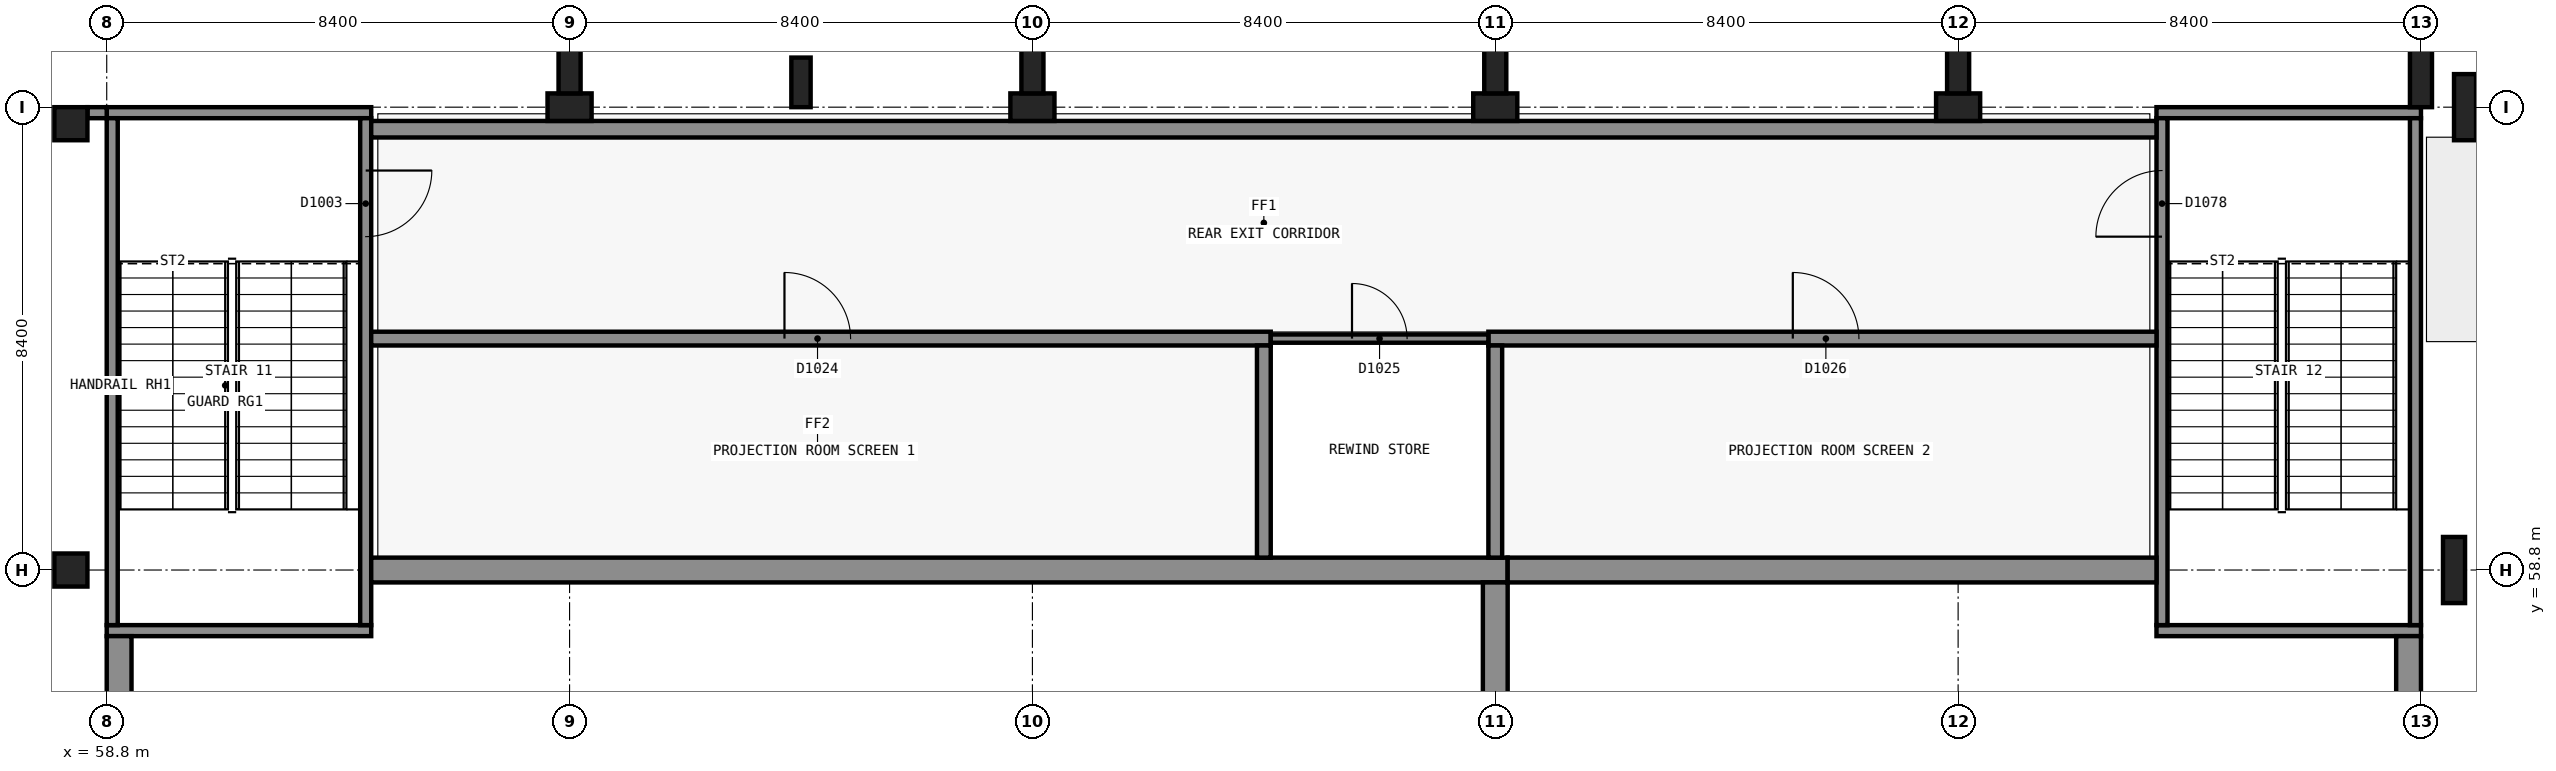
"""IFC4 building model, lengths in metres.
Left out: names, types, materials, properties, quantities, classifications, styles, units other than length and angle.
Written with IfcOpenShell. Run it as: python <this file> out.ifc"""

import sys

from ifc_helpers import new_model, si_unit, direction, frame, frame_2d, origin, origin_2d, place, context, subcontext, project, spatial, rectangle, extrude, element, fill, save


model = new_model("IFC4")
c1 = context("Model", 3, precision=1e-05, world=origin(), true_north=direction((0.0, 1.0)))
c2 = subcontext(c1, "Body", "Model", "MODEL_VIEW")
j1 = project(units=[si_unit("LENGTHUNIT", "METRE"), si_unit("PLANEANGLEUNIT", "RADIAN")], contexts=[c1])
p1 = place(None, origin())
s1 = spatial("IfcSite", under=j1, at=p1, CompositionType="ELEMENT")
p2 = place(p1, origin())
s2 = spatial("IfcBuilding", under=s1, at=p2, CompositionType="ELEMENT")
p3 = place(p2, frame((0.0, 0.0, 5.4)))
s3 = spatial("IfcBuildingStorey", under=s2, at=p3, CompositionType="ELEMENT", Elevation=5.4)
for number, where, z_axis, x_axis in (
    (1, (63.6, 57.7, 0.0), (0.0, 0.0, 1.0), (-1.0, 0.0, 0.0)),
    (2, (58.8, 67.1, 0.0), (0.0, 0.0, 1.0), (1.0, 0.0, 0.0)),
):
    element("IfcWall", number, at=place(p3, frame(where, z_axis=z_axis, x_axis=x_axis)), inside=s3, PredefinedType="SHEAR", context=c2, shape_type="SweptSolid", body=[
        extrude(rectangle(XDim=4.8, YDim=0.2, at=frame_2d((2.4, 0.0))), origin(), (0.0, 0.0, 1.0), 4.8),
    ])
p4 = place(p3, frame((58.9, 57.8, 0.0), z_axis=(0.0, 0.0, 1.0), x_axis=(0.0, 1.0, 0.0)))
e3 = element("IfcWall", 3, at=p4, inside=s3, PredefinedType="SHEAR", context=c2, shape_type="SweptSolid", body=[
    extrude(rectangle(XDim=9.2, YDim=0.2, at=frame_2d((4.6, 0.0))), origin(), (0.0, 0.0, 1.0), 4.8),
])
p5 = place(p3, frame((63.5, 67.0, 0.0), z_axis=(0.0, 0.0, 1.0), x_axis=(0.0, -1.0, 0.0)))
e4 = element("IfcWall", 4, at=p5, inside=s3, PredefinedType="SHEAR", context=c2, shape_type="SweptSolid", body=[
    extrude(rectangle(XDim=9.2, YDim=0.2, at=frame_2d((4.6, 0.0))), origin(), (0.0, 0.0, 1.0), 4.8),
])
p6 = place(p5, frame((0.95, 0.0, 0.0)))
e5 = element("IfcOpeningElement", 5, at=p6, cuts=e4, PredefinedType="OPENING", context=c2, shape_type="SweptSolid", body=[
    extrude(rectangle(XDim=1.2, YDim=2.1, at=frame_2d((0.6, 1.05))), frame((0.0, 0.11, 0.0), z_axis=(0.0, -1.0, 0.0), x_axis=(1.0, 0.0, 0.0)), (0.0, 0.0, 1.0), 0.22),
])
for number, where, z_axis, x_axis in (
    (6, (100.8, 57.7, 0.0), (0.0, 0.0, 1.0), (-1.0, 0.0, 0.0)),
    (7, (96.0, 67.1, 0.0), (0.0, 0.0, 1.0), (1.0, 0.0, 0.0)),
):
    element("IfcWall", number, at=place(p3, frame(where, z_axis=z_axis, x_axis=x_axis)), inside=s3, PredefinedType="SHEAR", context=c2, shape_type="SweptSolid", body=[
        extrude(rectangle(XDim=4.8, YDim=0.2, at=frame_2d((2.4, 0.0))), origin(), (0.0, 0.0, 1.0), 4.8),
    ])
p7 = place(p3, frame((96.1, 57.8, 0.0), z_axis=(0.0, 0.0, 1.0), x_axis=(0.0, 1.0, 0.0)))
e8 = element("IfcWall", 8, at=p7, inside=s3, PredefinedType="SHEAR", context=c2, shape_type="SweptSolid", body=[
    extrude(rectangle(XDim=9.2, YDim=0.2, at=frame_2d((4.6, 0.0))), origin(), (0.0, 0.0, 1.0), 4.8),
])
p8 = place(p7, frame((7.05, 0.0, 0.0)))
e9 = element("IfcOpeningElement", 9, at=p8, cuts=e8, PredefinedType="OPENING", context=c2, shape_type="SweptSolid", body=[
    extrude(rectangle(XDim=1.2, YDim=2.1, at=frame_2d((0.6, 1.05))), frame((0.0, 0.11, 0.0), z_axis=(0.0, -1.0, 0.0), x_axis=(1.0, 0.0, 0.0)), (0.0, 0.0, 1.0), 0.22),
])
p9 = place(p3, frame((100.7, 67.0, 0.0), z_axis=(0.0, 0.0, 1.0), x_axis=(0.0, -1.0, 0.0)))
e10 = element("IfcWall", 10, at=p9, inside=s3, PredefinedType="SHEAR", context=c2, shape_type="SweptSolid", body=[
    extrude(rectangle(XDim=9.2, YDim=0.2, at=frame_2d((4.6, 0.0))), origin(), (0.0, 0.0, 1.0), 4.8),
])
p10 = place(p3, frame((63.6, 58.8, 0.0), z_axis=(0.0, 0.0, 1.0), x_axis=(1.0, 0.0, 0.0)))
e11 = element("IfcWall", 11, at=p10, inside=s3, PredefinedType="SHEAR", context=c2, shape_type="SweptSolid", body=[
    extrude(rectangle(XDim=20.625, YDim=0.45, at=frame_2d((10.312, 0.0))), origin(), (0.0, 0.0, 1.0), 4.8),
])
p11 = place(p3, frame((59.025, 33.825, 0.0), z_axis=(0.0, 0.0, 1.0), x_axis=(0.0, 1.0, 0.0)))
e12 = element("IfcWall", 12, at=p11, inside=s3, PredefinedType="SHEAR", context=c2, shape_type="SweptSolid", body=[
    extrude(rectangle(XDim=23.775, YDim=0.45, at=frame_2d((11.888, 0.0))), origin(), (0.0, 0.0, 1.0), 4.8),
])
p12 = place(p3, frame((84.0, 58.575, 0.0), z_axis=(0.0, 0.0, 1.0), x_axis=(0.0, -1.0, 0.0)))
e13 = element("IfcWall", 13, at=p12, inside=s3, PredefinedType="SHEAR", context=c2, shape_type="SweptSolid", body=[
    extrude(rectangle(XDim=24.75, YDim=0.45, at=frame_2d((12.375, 0.0))), origin(), (0.0, 0.0, 1.0), 4.8),
])
p13 = place(p3, frame((84.225, 58.8, 0.0), z_axis=(0.0, 0.0, 1.0), x_axis=(1.0, 0.0, 0.0)))
e14 = element("IfcWall", 14, at=p13, inside=s3, PredefinedType="SHEAR", context=c2, shape_type="SweptSolid", body=[
    extrude(rectangle(XDim=11.775, YDim=0.45, at=frame_2d((5.887, 0.0))), origin(), (0.0, 0.0, 1.0), 4.8),
])
p14 = place(p3, frame((100.575, 57.6, 0.0), z_axis=(0.0, 0.0, 1.0), x_axis=(0.0, -1.0, 0.0)))
e15 = element("IfcWall", 15, at=p14, inside=s3, PredefinedType="SHEAR", context=c2, shape_type="SweptSolid", body=[
    extrude(rectangle(XDim=22.8, YDim=0.45, at=frame_2d((11.4, 0.0))), origin(), (0.0, 0.0, 1.0), 4.8),
])
for number, where, z_axis, x_axis in (
    (16, (67.2, 67.2, 0.0), (0.0, 0.0, 1.0), (1.0, 0.0, 0.0)),
    (17, (75.6, 67.2, 0.0), (0.0, 0.0, 1.0), (1.0, 0.0, 0.0)),
    (18, (84.0, 67.2, 0.0), (0.0, 0.0, 1.0), (1.0, 0.0, 0.0)),
    (19, (92.4, 67.2, 0.0), (0.0, 0.0, 1.0), (1.0, 0.0, 0.0)),
):
    element("IfcColumn", number, at=place(p3, frame(where, z_axis=z_axis, x_axis=x_axis)), inside=s3, PredefinedType="COLUMN", context=c2, shape_type="SweptSolid", body=[
        extrude(rectangle(XDim=0.8, YDim=0.5, at=origin_2d()), origin(), (0.0, 0.0, 1.0), 4.8),
    ])
for number, where, z_axis, x_axis in (
    (20, (58.15, 58.8, 0.0), (0.0, 0.0, 1.0), (1.0, 0.0, 0.0)),
    (21, (58.15, 66.9, 0.0), (0.0, 0.0, 1.0), (1.0, 0.0, 0.0)),
):
    element("IfcColumn", number, at=place(p3, frame(where, z_axis=z_axis, x_axis=x_axis)), inside=s3, PredefinedType="COLUMN", context=c2, shape_type="SweptSolid", body=[
        extrude(rectangle(XDim=0.6, YDim=0.6, at=origin_2d()), origin(), (0.0, 0.0, 1.0), 4.8),
    ])
p15 = place(p3, frame((58.45, 67.1, 0.0), z_axis=(0.0, 0.0, 1.0), x_axis=(1.0, 0.0, 0.0)))
e22 = element("IfcWall", 22, at=p15, inside=s3, PredefinedType="SHEAR", context=c2, shape_type="SweptSolid", body=[
    extrude(rectangle(XDim=0.35, YDim=0.2, at=frame_2d((0.175, 0.0))), origin(), (0.0, 0.0, 1.0), 4.8),
])
for number, where, z_axis, x_axis in (
    (23, (101.4, 58.8, 0.0), (0.0, 0.0, 1.0), (0.0, 1.0, 0.0)),
    (24, (101.6, 67.2, 0.0), (0.0, 0.0, 1.0), (0.0, 1.0, 0.0)),
):
    element("IfcColumn", number, at=place(p3, frame(where, z_axis=z_axis, x_axis=x_axis)), inside=s3, PredefinedType="PILASTER", context=c2, shape_type="SweptSolid", body=[
        extrude(rectangle(XDim=0.4, YDim=1.2, at=origin_2d()), origin(), (0.0, 0.0, 1.0), 4.8),
    ])
p16 = place(p3, frame((63.6, 66.8, 0.0), z_axis=(0.0, 0.0, 1.0), x_axis=(1.0, 0.0, 0.0)))
e25 = element("IfcWall", 25, at=p16, inside=s3, PredefinedType="SOLIDWALL", context=c2, shape_type="SweptSolid", body=[
    extrude(rectangle(XDim=32.4, YDim=0.3, at=frame_2d((16.2, 0.0))), origin(), (0.0, 0.0, 1.0), 4.5),
])
p17 = place(p3, frame((67.2, 68.05, 0.0), z_axis=(0.0, 0.0, 1.0), x_axis=(1.0, 0.0, 0.0)))
e26 = element("IfcColumn", 26, at=p17, inside=s3, PredefinedType="PILASTER", context=c2, shape_type="SweptSolid", body=[
    extrude(rectangle(XDim=0.4, YDim=1.2, at=origin_2d()), origin(), (0.0, 0.0, 1.0), 4.8),
])
p18 = place(p3, frame((71.4, 67.65, 0.0), z_axis=(0.0, 0.0, 1.0), x_axis=(1.0, 0.0, 0.0)))
e27 = element("IfcColumn", 27, at=p18, inside=s3, PredefinedType="PILASTER", context=c2, shape_type="SweptSolid", body=[
    extrude(rectangle(XDim=0.35, YDim=0.9, at=origin_2d()), origin(), (0.0, 0.0, 1.0), 4.8),
])
for number, where, z_axis, x_axis in (
    (28, (75.6, 68.05, 0.0), (0.0, 0.0, 1.0), (1.0, 0.0, 0.0)),
    (29, (84.0, 68.05, 0.0), (0.0, 0.0, 1.0), (1.0, 0.0, 0.0)),
    (30, (92.4, 68.05, 0.0), (0.0, 0.0, 1.0), (1.0, 0.0, 0.0)),
    (31, (100.8, 67.8, 0.0), (0.0, 0.0, 1.0), (1.0, 0.0, 0.0)),
):
    element("IfcColumn", number, at=place(p3, frame(where, z_axis=z_axis, x_axis=x_axis)), inside=s3, PredefinedType="PILASTER", context=c2, shape_type="SweptSolid", body=[
        extrude(rectangle(XDim=0.4, YDim=1.2, at=origin_2d()), origin(), (0.0, 0.0, 1.0), 4.8),
    ])
p19 = place(p3, frame((63.6, 63.0, 0.0), z_axis=(0.0, 0.0, 1.0), x_axis=(1.0, 0.0, 0.0)))
e32 = element("IfcWall", 32, at=p19, inside=s3, PredefinedType="PARTITIONING", context=c2, shape_type="SweptSolid", body=[
    extrude(rectangle(XDim=16.325, YDim=0.25, at=frame_2d((8.163, 0.0))), origin(), (0.0, 0.0, 1.0), 3.8),
])
p20 = place(p19, frame((7.5, 0.0, 0.0)))
e33 = element("IfcOpeningElement", 33, at=p20, cuts=e32, PredefinedType="OPENING", context=c2, shape_type="SweptSolid", body=[
    extrude(rectangle(XDim=1.2, YDim=2.1, at=frame_2d((0.6, 1.05))), frame((0.0, 0.135, 0.0), z_axis=(0.0, -1.0, 0.0), x_axis=(1.0, 0.0, 0.0)), (0.0, 0.0, 1.0), 0.27),
])
p21 = place(p3, frame((83.875, 63.0, 0.0), z_axis=(0.0, 0.0, 1.0), x_axis=(1.0, 0.0, 0.0)))
e34 = element("IfcWall", 34, at=p21, inside=s3, PredefinedType="PARTITIONING", context=c2, shape_type="SweptSolid", body=[
    extrude(rectangle(XDim=12.125, YDim=0.25, at=frame_2d((6.062, 0.0))), origin(), (0.0, 0.0, 1.0), 3.8),
])
p22 = place(p21, frame((5.525, 0.0, 0.0)))
e35 = element("IfcOpeningElement", 35, at=p22, cuts=e34, PredefinedType="OPENING", context=c2, shape_type="SweptSolid", body=[
    extrude(rectangle(XDim=1.2, YDim=2.1, at=frame_2d((0.6, 1.05))), frame((0.0, 0.135, 0.0), z_axis=(0.0, -1.0, 0.0), x_axis=(1.0, 0.0, 0.0)), (0.0, 0.0, 1.0), 0.27),
])
p23 = place(p3, frame((79.8, 59.025, 0.0), z_axis=(0.0, 0.0, 1.0), x_axis=(0.0, 1.0, 0.0)))
e36 = element("IfcWall", 36, at=p23, inside=s3, PredefinedType="PARTITIONING", context=c2, shape_type="SweptSolid", body=[
    extrude(rectangle(XDim=3.85, YDim=0.25, at=frame_2d((1.925, 0.0))), origin(), (0.0, 0.0, 1.0), 4.5),
])
p24 = place(p3, frame((84.0, 59.025, 0.0), z_axis=(0.0, 0.0, 1.0), x_axis=(0.0, 1.0, 0.0)))
e37 = element("IfcWall", 37, at=p24, inside=s3, PredefinedType="PARTITIONING", context=c2, shape_type="SweptSolid", body=[
    extrude(rectangle(XDim=3.85, YDim=0.25, at=frame_2d((1.925, 0.0))), origin(), (0.0, 0.0, 1.0), 3.8),
])
p25 = place(p3, frame((79.925, 63.0, 0.0), z_axis=(0.0, 0.0, 1.0), x_axis=(1.0, 0.0, 0.0)))
e38 = element("IfcWall", 38, at=p25, inside=s3, PredefinedType="PARTITIONING", context=c2, shape_type="SweptSolid", body=[
    extrude(rectangle(XDim=3.95, YDim=0.15, at=frame_2d((1.975, 0.0))), origin(), (0.0, 0.0, 1.0), 3.8),
])
p26 = place(p25, frame((1.475, 0.0, 0.0)))
e39 = element("IfcOpeningElement", 39, at=p26, cuts=e38, PredefinedType="OPENING", context=c2, shape_type="SweptSolid", body=[
    extrude(rectangle(XDim=1.0, YDim=2.1, at=frame_2d((0.5, 1.05))), frame((0.0, 0.085, 0.0), z_axis=(0.0, -1.0, 0.0), x_axis=(1.0, 0.0, 0.0)), (0.0, 0.0, 1.0), 0.17),
])
p27 = place(p6, origin())
e40 = element("IfcDoor", 40, at=p27, inside=s3, OperationType="SINGLE_SWING_RIGHT", PredefinedType="DOOR", context=c2, shape_type="SweptSolid", body=[
    extrude(rectangle(XDim=1.2, YDim=2.1, at=frame_2d((0.6, 1.05))), frame((0.0, 0.025, 0.0), z_axis=(0.0, -1.0, 0.0), x_axis=(1.0, 0.0, 0.0)), (0.0, 0.0, 1.0), 0.05),
])
fill(e5, e40)
p28 = place(p20, origin())
e41 = element("IfcDoor", 41, at=p28, inside=s3, OperationType="SINGLE_SWING_RIGHT", PredefinedType="DOOR", context=c2, shape_type="SweptSolid", body=[
    extrude(rectangle(XDim=1.2, YDim=2.1, at=frame_2d((0.6, 1.05))), frame((0.0, 0.025, 0.0), z_axis=(0.0, -1.0, 0.0), x_axis=(1.0, 0.0, 0.0)), (0.0, 0.0, 1.0), 0.05),
])
fill(e33, e41)
p29 = place(p26, origin())
e42 = element("IfcDoor", 42, at=p29, inside=s3, OperationType="SINGLE_SWING_RIGHT", PredefinedType="DOOR", context=c2, shape_type="SweptSolid", body=[
    extrude(rectangle(XDim=1.0, YDim=2.1, at=frame_2d((0.5, 1.05))), frame((0.0, 0.025, 0.0), z_axis=(0.0, -1.0, 0.0), x_axis=(1.0, 0.0, 0.0)), (0.0, 0.0, 1.0), 0.05),
])
fill(e39, e42)
p30 = place(p22, origin())
e43 = element("IfcDoor", 43, at=p30, inside=s3, OperationType="SINGLE_SWING_RIGHT", PredefinedType="DOOR", context=c2, shape_type="SweptSolid", body=[
    extrude(rectangle(XDim=1.2, YDim=2.1, at=frame_2d((0.6, 1.05))), frame((0.0, 0.025, 0.0), z_axis=(0.0, -1.0, 0.0), x_axis=(1.0, 0.0, 0.0)), (0.0, 0.0, 1.0), 0.05),
])
fill(e35, e43)
p31 = place(p8, origin())
e44 = element("IfcDoor", 44, at=p31, inside=s3, OperationType="SINGLE_SWING_RIGHT", PredefinedType="DOOR", context=c2, shape_type="SweptSolid", body=[
    extrude(rectangle(XDim=1.2, YDim=2.1, at=frame_2d((0.6, 1.05))), frame((0.0, 0.025, 0.0), z_axis=(0.0, -1.0, 0.0), x_axis=(1.0, 0.0, 0.0)), (0.0, 0.0, 1.0), 0.05),
])
fill(e9, e44)
save(model, sys.argv[1])
